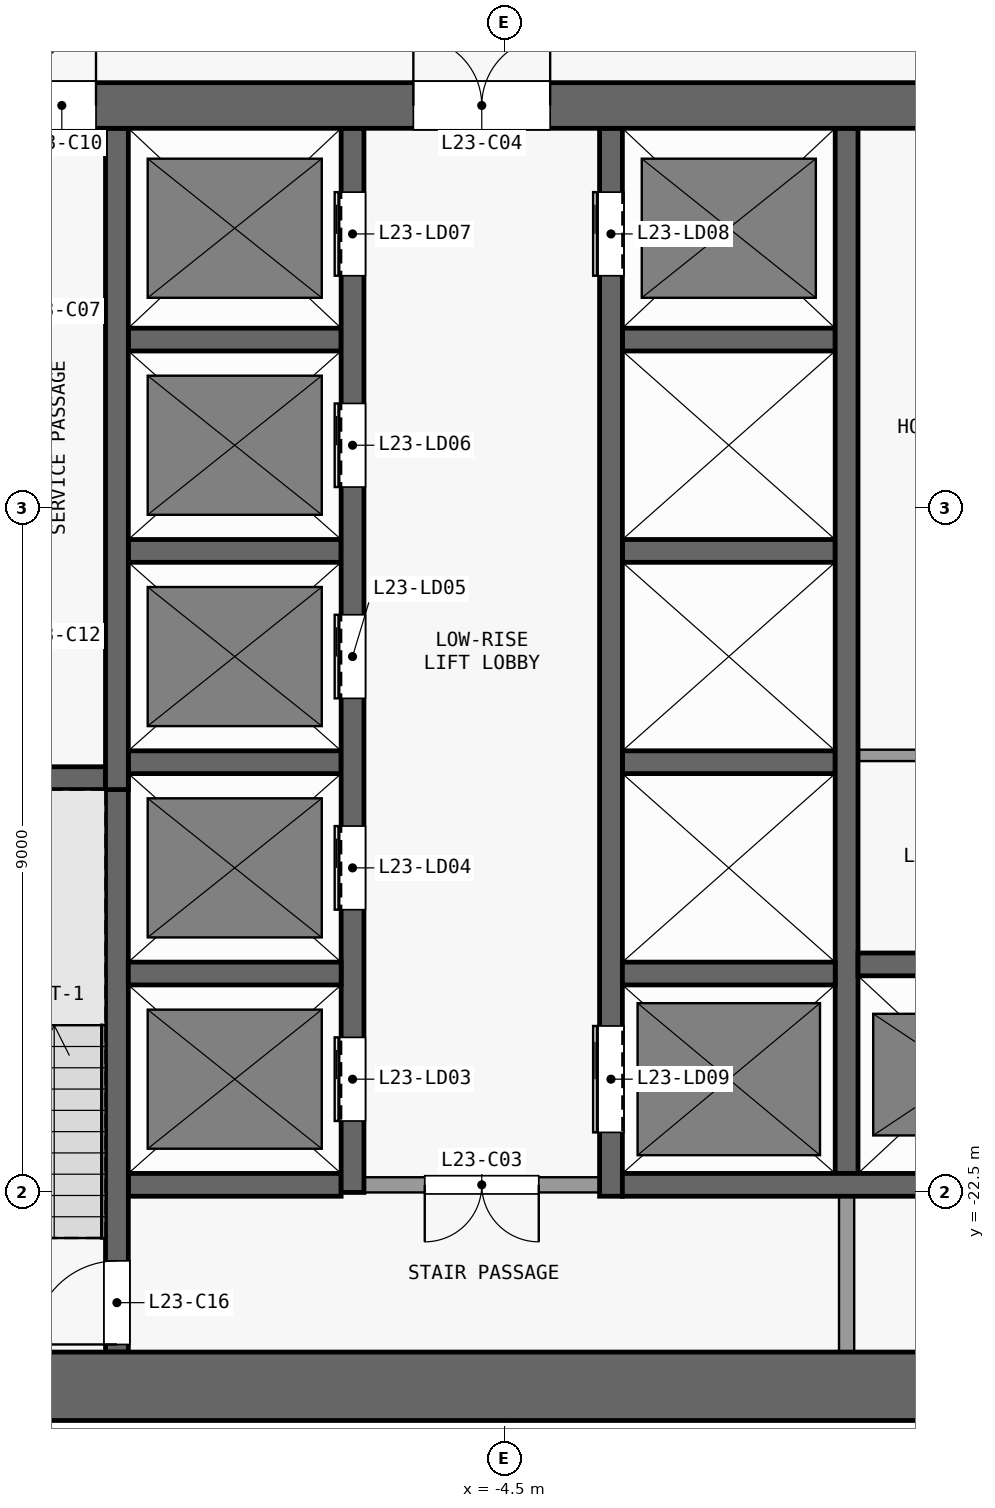
"""IFC4 building model, lengths in metres.
Left out: names, types, materials, properties, quantities, classifications, styles, units other than length and angle.
Written with IfcOpenShell. Run it as: python <this file> out.ifc"""

import sys

from ifc_helpers import new_model, si_unit, direction, frame, frame_2d, origin, place, context, subcontext, project, spatial, rectangle, extrude, element, fill, save


model = new_model("IFC4")
c1 = context("Model", 3, precision=1e-05, world=origin(), true_north=direction((0.0, 1.0)))
c2 = subcontext(c1, "Body", "Model", "MODEL_VIEW")
j1 = project(units=[si_unit("LENGTHUNIT", "METRE"), si_unit("PLANEANGLEUNIT", "RADIAN")], contexts=[c1])
p1 = place(None, origin())
s1 = spatial("IfcSite", under=j1, at=p1, CompositionType="ELEMENT")
p2 = place(p1, origin())
s2 = spatial("IfcBuilding", under=s1, at=p2, CompositionType="ELEMENT")
p3 = place(p2, frame((0.0, 0.0, 95.5)))
s3 = spatial("IfcBuildingStorey", under=s2, at=p3, CompositionType="ELEMENT", Elevation=95.5)
p4 = place(p3, frame((-13.4, -25.05, 0.0), z_axis=(0.0, 0.0, 1.0), x_axis=(1.0, 0.0, 0.0)))
e1 = element("IfcWall", 1, at=p4, inside=s3, PredefinedType="SHEAR", context=c2, shape_type="SweptSolid", body=[
    extrude(rectangle(XDim=26.8, YDim=0.9, at=frame_2d((13.4, 0.0))), origin(), (0.0, 0.0, 1.0), 3.3),
])
p5 = place(p3, frame((-13.4, -8.2, 0.0), z_axis=(0.0, 0.0, 1.0), x_axis=(1.0, 0.0, 0.0)))
e2 = element("IfcWall", 2, at=p5, inside=s3, PredefinedType="SHEAR", context=c2, shape_type="SweptSolid", body=[
    extrude(rectangle(XDim=26.8, YDim=0.6, at=frame_2d((13.4, 0.0))), origin(), (0.0, 0.0, 1.0), 3.3),
])
p6 = place(p5, frame((7.7, 0.0, 0.0)))
e3 = element("IfcOpeningElement", 3, at=p6, cuts=e2, PredefinedType="OPENING", context=c2, shape_type="SweptSolid", body=[
    extrude(rectangle(XDim=1.8, YDim=2.1, at=frame_2d((0.9, 1.05))), frame((0.0, 0.31, 0.0), z_axis=(0.0, -1.0, 0.0), x_axis=(1.0, 0.0, 0.0)), (0.0, 0.0, 1.0), 0.62),
])
p7 = place(p5, frame((17.3, 0.0, 0.0)))
e4 = element("IfcOpeningElement", 4, at=p7, cuts=e2, PredefinedType="OPENING", context=c2, shape_type="SweptSolid", body=[
    extrude(rectangle(XDim=1.8, YDim=2.1, at=frame_2d((0.9, 1.05))), frame((0.0, 0.31, 0.0), z_axis=(0.0, -1.0, 0.0), x_axis=(1.0, 0.0, 0.0)), (0.0, 0.0, 1.0), 0.62),
])
p8 = place(p5, frame((2.625, 0.0, 0.0)))
e5 = element("IfcOpeningElement", 5, at=p8, cuts=e2, PredefinedType="OPENING", context=c2, shape_type="SweptSolid", body=[
    extrude(rectangle(XDim=0.9, YDim=2.1, at=frame_2d((0.45, 1.05))), frame((0.0, 0.31, 0.0), z_axis=(0.0, -1.0, 0.0), x_axis=(1.0, 0.0, 0.0)), (0.0, 0.0, 1.0), 0.62),
])
p9 = place(p5, frame((23.275, 0.0, 0.0)))
e6 = element("IfcOpeningElement", 6, at=p9, cuts=e2, PredefinedType="OPENING", context=c2, shape_type="SweptSolid", body=[
    extrude(rectangle(XDim=0.9, YDim=2.1, at=frame_2d((0.45, 1.05))), frame((0.0, 0.31, 0.0), z_axis=(0.0, -1.0, 0.0), x_axis=(1.0, 0.0, 0.0)), (0.0, 0.0, 1.0), 0.62),
])
p10 = place(p3, frame((-9.45, -22.4, 0.0), z_axis=(0.0, 0.0, 1.0), x_axis=(1.0, 0.0, 0.0)))
e7 = element("IfcWall", 7, at=p10, inside=s3, PredefinedType="SHEAR", context=c2, shape_type="SweptSolid", body=[
    extrude(rectangle(XDim=2.8, YDim=0.3, at=frame_2d((1.4, 0.0))), origin(), (0.0, 0.0, 1.0), 3.3),
])
p11 = place(p3, frame((-3.25, -22.4, 0.0), z_axis=(0.0, 0.0, 1.0), x_axis=(-1.0, 0.0, 0.0)))
e8 = element("IfcWall", 8, at=p11, inside=s3, PredefinedType="PARTITIONING", context=c2, shape_type="SweptSolid", body=[
    extrude(rectangle(XDim=3.1, YDim=0.2, at=frame_2d((1.55, 0.0))), origin(), (0.0, 0.0, 1.0), 3.3),
])
p12 = place(p11, frame((0.8, 0.0, 0.0)))
e9 = element("IfcOpeningElement", 9, at=p12, cuts=e8, PredefinedType="OPENING", context=c2, shape_type="SweptSolid", body=[
    extrude(rectangle(XDim=1.5, YDim=2.1, at=frame_2d((0.75, 1.05))), frame((0.0, 0.11, 0.0), z_axis=(0.0, -1.0, 0.0), x_axis=(1.0, 0.0, 0.0)), (0.0, 0.0, 1.0), 0.22),
])
p13 = place(p3, frame((-2.95, -22.4, 0.0), z_axis=(0.0, 0.0, 1.0), x_axis=(1.0, 0.0, 0.0)))
e10 = element("IfcWall", 10, at=p13, inside=s3, PredefinedType="SHEAR", context=c2, shape_type="SweptSolid", body=[
    extrude(rectangle(XDim=6.2, YDim=0.3, at=frame_2d((3.1, 0.0))), origin(), (0.0, 0.0, 1.0), 3.3),
])
for number, where, z_axis, x_axis in (
    (11, (-9.45, -19.62, 0.0), (0.0, 0.0, 1.0), (1.0, 0.0, 0.0)),
    (12, (-2.95, -19.62, 0.0), (0.0, 0.0, 1.0), (1.0, 0.0, 0.0)),
):
    element("IfcWall", number, at=place(p3, frame(where, z_axis=z_axis, x_axis=x_axis)), inside=s3, PredefinedType="SHEAR", context=c2, shape_type="SweptSolid", body=[
        extrude(rectangle(XDim=2.8, YDim=0.3, at=frame_2d((1.4, 0.0))), origin(), (0.0, 0.0, 1.0), 3.3),
    ])
p14 = place(p3, frame((0.15, -19.5, 0.0), z_axis=(0.0, 0.0, 1.0), x_axis=(1.0, 0.0, 0.0)))
e13 = element("IfcWall", 13, at=p14, inside=s3, PredefinedType="SHEAR", context=c2, shape_type="SweptSolid", body=[
    extrude(rectangle(XDim=3.025, YDim=0.3, at=frame_2d((1.513, 0.0))), origin(), (0.0, 0.0, 1.0), 3.3),
])
p15 = place(p3, frame((-12.6, -17.05, 0.0), z_axis=(0.0, 0.0, 1.0), x_axis=(1.0, 0.0, 0.0)))
e14 = element("IfcWall", 14, at=p15, inside=s3, PredefinedType="SHEAR", context=c2, shape_type="SweptSolid", body=[
    extrude(rectangle(XDim=2.85, YDim=0.3, at=frame_2d((1.425, 0.0))), origin(), (0.0, 0.0, 1.0), 3.3),
])
for number, where, z_axis, x_axis in (
    (15, (-9.45, -16.84, 0.0), (0.0, 0.0, 1.0), (1.0, 0.0, 0.0)),
    (16, (-2.95, -16.84, 0.0), (0.0, 0.0, 1.0), (1.0, 0.0, 0.0)),
):
    element("IfcWall", number, at=place(p3, frame(where, z_axis=z_axis, x_axis=x_axis)), inside=s3, PredefinedType="SHEAR", context=c2, shape_type="SweptSolid", body=[
        extrude(rectangle(XDim=2.8, YDim=0.3, at=frame_2d((1.4, 0.0))), origin(), (0.0, 0.0, 1.0), 3.3),
    ])
p16 = place(p3, frame((0.15, -16.75, 0.0), z_axis=(0.0, 0.0, 1.0), x_axis=(1.0, 0.0, 0.0)))
e17 = element("IfcWall", 17, at=p16, inside=s3, PredefinedType="PARTITIONING", context=c2, shape_type="SweptSolid", body=[
    extrude(rectangle(XDim=2.875, YDim=0.15, at=frame_2d((1.438, 0.0))), origin(), (0.0, 0.0, 1.0), 3.3),
])
for number, where, z_axis, x_axis in (
    (18, (-9.45, -14.06, 0.0), (0.0, 0.0, 1.0), (1.0, 0.0, 0.0)),
    (19, (-2.95, -14.06, 0.0), (0.0, 0.0, 1.0), (1.0, 0.0, 0.0)),
    (20, (-9.45, -11.28, 0.0), (0.0, 0.0, 1.0), (1.0, 0.0, 0.0)),
    (21, (-2.95, -11.28, 0.0), (0.0, 0.0, 1.0), (1.0, 0.0, 0.0)),
):
    element("IfcWall", number, at=place(p3, frame(where, z_axis=z_axis, x_axis=x_axis)), inside=s3, PredefinedType="SHEAR", context=c2, shape_type="SweptSolid", body=[
        extrude(rectangle(XDim=2.8, YDim=0.3, at=frame_2d((1.4, 0.0))), origin(), (0.0, 0.0, 1.0), 3.3),
    ])
p17 = place(p3, frame((-9.6, -24.6, 0.0), z_axis=(0.0, 0.0, 1.0), x_axis=(0.0, 1.0, 0.0)))
e22 = element("IfcWall", 22, at=p17, inside=s3, PredefinedType="SHEAR", context=c2, shape_type="SweptSolid", body=[
    extrude(rectangle(XDim=7.7, YDim=0.3, at=frame_2d((3.85, 0.0))), origin(), (0.0, 0.0, 1.0), 3.3),
])
p18 = place(p17, frame((0.1, 0.0, 0.0)))
e23 = element("IfcOpeningElement", 23, at=p18, cuts=e22, PredefinedType="OPENING", context=c2, shape_type="SweptSolid", body=[
    extrude(rectangle(XDim=1.1, YDim=2.1, at=frame_2d((0.55, 1.05))), frame((0.0, 0.16, 0.0), z_axis=(0.0, -1.0, 0.0), x_axis=(1.0, 0.0, 0.0)), (0.0, 0.0, 1.0), 0.32),
])
p19 = place(p3, frame((-9.6, -17.2, 0.0), z_axis=(0.0, 0.0, 1.0), x_axis=(0.0, 1.0, 0.0)))
e24 = element("IfcWall", 24, at=p19, inside=s3, PredefinedType="SHEAR", context=c2, shape_type="SweptSolid", body=[
    extrude(rectangle(XDim=8.7, YDim=0.3, at=frame_2d((4.35, 0.0))), origin(), (0.0, 0.0, 1.0), 3.3),
])
p20 = place(p3, frame((-6.5, -22.5, 0.0), z_axis=(0.0, 0.0, 1.0), x_axis=(0.0, 1.0, 0.0)))
e25 = element("IfcWall", 25, at=p20, inside=s3, PredefinedType="SHEAR", context=c2, shape_type="SweptSolid", body=[
    extrude(rectangle(XDim=14.0, YDim=0.3, at=frame_2d((7.0, 0.0))), origin(), (0.0, 0.0, 1.0), 3.3),
])
p21 = place(p20, frame((0.94, 0.0, 0.0)))
e26 = element("IfcOpeningElement", 26, at=p21, cuts=e25, PredefinedType="OPENING", context=c2, shape_type="SweptSolid", body=[
    extrude(rectangle(XDim=1.1, YDim=2.1, at=frame_2d((0.55, 1.05))), frame((0.0, 0.16, 0.0), z_axis=(0.0, -1.0, 0.0), x_axis=(1.0, 0.0, 0.0)), (0.0, 0.0, 1.0), 0.32),
])
p22 = place(p20, frame((3.72, 0.0, 0.0)))
e27 = element("IfcOpeningElement", 27, at=p22, cuts=e25, PredefinedType="OPENING", context=c2, shape_type="SweptSolid", body=[
    extrude(rectangle(XDim=1.1, YDim=2.1, at=frame_2d((0.55, 1.05))), frame((0.0, 0.16, 0.0), z_axis=(0.0, -1.0, 0.0), x_axis=(1.0, 0.0, 0.0)), (0.0, 0.0, 1.0), 0.32),
])
p23 = place(p20, frame((6.5, 0.0, 0.0)))
e28 = element("IfcOpeningElement", 28, at=p23, cuts=e25, PredefinedType="OPENING", context=c2, shape_type="SweptSolid", body=[
    extrude(rectangle(XDim=1.1, YDim=2.1, at=frame_2d((0.55, 1.05))), frame((0.0, 0.16, 0.0), z_axis=(0.0, -1.0, 0.0), x_axis=(1.0, 0.0, 0.0)), (0.0, 0.0, 1.0), 0.32),
])
p24 = place(p20, frame((9.28, 0.0, 0.0)))
e29 = element("IfcOpeningElement", 29, at=p24, cuts=e25, PredefinedType="OPENING", context=c2, shape_type="SweptSolid", body=[
    extrude(rectangle(XDim=1.1, YDim=2.1, at=frame_2d((0.55, 1.05))), frame((0.0, 0.16, 0.0), z_axis=(0.0, -1.0, 0.0), x_axis=(1.0, 0.0, 0.0)), (0.0, 0.0, 1.0), 0.32),
])
p25 = place(p20, frame((12.06, 0.0, 0.0)))
e30 = element("IfcOpeningElement", 30, at=p25, cuts=e25, PredefinedType="OPENING", context=c2, shape_type="SweptSolid", body=[
    extrude(rectangle(XDim=1.1, YDim=2.1, at=frame_2d((0.55, 1.05))), frame((0.0, 0.16, 0.0), z_axis=(0.0, -1.0, 0.0), x_axis=(1.0, 0.0, 0.0)), (0.0, 0.0, 1.0), 0.32),
])
p26 = place(p3, frame((-3.1, -22.55, 0.0), z_axis=(0.0, 0.0, 1.0), x_axis=(0.0, 1.0, 0.0)))
e31 = element("IfcWall", 31, at=p26, inside=s3, PredefinedType="SHEAR", context=c2, shape_type="SweptSolid", body=[
    extrude(rectangle(XDim=14.05, YDim=0.3, at=frame_2d((7.025, 0.0))), origin(), (0.0, 0.0, 1.0), 3.3),
])
p27 = place(p26, frame((12.11, 0.0, 0.0)))
e32 = element("IfcOpeningElement", 32, at=p27, cuts=e31, PredefinedType="OPENING", context=c2, shape_type="SweptSolid", body=[
    extrude(rectangle(XDim=1.1, YDim=2.1, at=frame_2d((0.55, 1.05))), frame((0.0, 0.16, 0.0), z_axis=(0.0, -1.0, 0.0), x_axis=(1.0, 0.0, 0.0)), (0.0, 0.0, 1.0), 0.32),
])
p28 = place(p26, frame((0.84, 0.0, 0.0)))
e33 = element("IfcOpeningElement", 33, at=p28, cuts=e31, PredefinedType="OPENING", context=c2, shape_type="SweptSolid", body=[
    extrude(rectangle(XDim=1.4, YDim=2.1, at=frame_2d((0.7, 1.05))), frame((0.0, 0.16, 0.0), z_axis=(0.0, -1.0, 0.0), x_axis=(1.0, 0.0, 0.0)), (0.0, 0.0, 1.0), 0.32),
])
p29 = place(p3, frame((0.0, -24.6, 0.0), z_axis=(0.0, 0.0, 1.0), x_axis=(0.0, 1.0, 0.0)))
e34 = element("IfcWall", 34, at=p29, inside=s3, PredefinedType="PARTITIONING", context=c2, shape_type="SweptSolid", body=[
    extrude(rectangle(XDim=2.05, YDim=0.2, at=frame_2d((1.025, 0.0))), origin(), (0.0, 0.0, 1.0), 3.3),
])
p30 = place(p3, frame((0.0, -22.25, 0.0), z_axis=(0.0, 0.0, 1.0), x_axis=(0.0, 1.0, 0.0)))
e35 = element("IfcWall", 35, at=p30, inside=s3, PredefinedType="SHEAR", context=c2, shape_type="SweptSolid", body=[
    extrude(rectangle(XDim=13.75, YDim=0.3, at=frame_2d((6.875, 0.0))), origin(), (0.0, 0.0, 1.0), 3.3),
])
p31 = place(p21, origin())
e36 = element("IfcDoor", 36, at=p31, inside=s3, OperationType="DOUBLE_DOOR_SLIDING", PredefinedType="DOOR", context=c2, shape_type="SweptSolid", body=[
    extrude(rectangle(XDim=1.1, YDim=2.1, at=frame_2d((0.55, 1.05))), frame((0.0, 0.025, 0.0), z_axis=(0.0, -1.0, 0.0), x_axis=(1.0, 0.0, 0.0)), (0.0, 0.0, 1.0), 0.05),
])
fill(e26, e36)
p32 = place(p22, origin())
e37 = element("IfcDoor", 37, at=p32, inside=s3, OperationType="DOUBLE_DOOR_SLIDING", PredefinedType="DOOR", context=c2, shape_type="SweptSolid", body=[
    extrude(rectangle(XDim=1.1, YDim=2.1, at=frame_2d((0.55, 1.05))), frame((0.0, 0.025, 0.0), z_axis=(0.0, -1.0, 0.0), x_axis=(1.0, 0.0, 0.0)), (0.0, 0.0, 1.0), 0.05),
])
fill(e27, e37)
p33 = place(p23, origin())
e38 = element("IfcDoor", 38, at=p33, inside=s3, OperationType="DOUBLE_DOOR_SLIDING", PredefinedType="DOOR", context=c2, shape_type="SweptSolid", body=[
    extrude(rectangle(XDim=1.1, YDim=2.1, at=frame_2d((0.55, 1.05))), frame((0.0, 0.025, 0.0), z_axis=(0.0, -1.0, 0.0), x_axis=(1.0, 0.0, 0.0)), (0.0, 0.0, 1.0), 0.05),
])
fill(e28, e38)
p34 = place(p24, origin())
e39 = element("IfcDoor", 39, at=p34, inside=s3, OperationType="DOUBLE_DOOR_SLIDING", PredefinedType="DOOR", context=c2, shape_type="SweptSolid", body=[
    extrude(rectangle(XDim=1.1, YDim=2.1, at=frame_2d((0.55, 1.05))), frame((0.0, 0.025, 0.0), z_axis=(0.0, -1.0, 0.0), x_axis=(1.0, 0.0, 0.0)), (0.0, 0.0, 1.0), 0.05),
])
fill(e29, e39)
p35 = place(p25, origin())
e40 = element("IfcDoor", 40, at=p35, inside=s3, OperationType="DOUBLE_DOOR_SLIDING", PredefinedType="DOOR", context=c2, shape_type="SweptSolid", body=[
    extrude(rectangle(XDim=1.1, YDim=2.1, at=frame_2d((0.55, 1.05))), frame((0.0, 0.025, 0.0), z_axis=(0.0, -1.0, 0.0), x_axis=(1.0, 0.0, 0.0)), (0.0, 0.0, 1.0), 0.05),
])
fill(e30, e40)
p36 = place(p27, origin())
e41 = element("IfcDoor", 41, at=p36, inside=s3, OperationType="DOUBLE_DOOR_SLIDING", PredefinedType="DOOR", context=c2, shape_type="SweptSolid", body=[
    extrude(rectangle(XDim=1.1, YDim=2.1, at=frame_2d((0.55, 1.05))), frame((0.0, 0.025, 0.0), z_axis=(0.0, -1.0, 0.0), x_axis=(1.0, 0.0, 0.0)), (0.0, 0.0, 1.0), 0.05),
])
fill(e32, e41)
p37 = place(p28, origin())
e42 = element("IfcDoor", 42, at=p37, inside=s3, OperationType="DOUBLE_DOOR_SLIDING", PredefinedType="DOOR", context=c2, shape_type="SweptSolid", body=[
    extrude(rectangle(XDim=1.4, YDim=2.1, at=frame_2d((0.7, 1.05))), frame((0.0, 0.025, 0.0), z_axis=(0.0, -1.0, 0.0), x_axis=(1.0, 0.0, 0.0)), (0.0, 0.0, 1.0), 0.05),
])
fill(e33, e42)
p38 = place(p12, origin())
e43 = element("IfcDoor", 43, at=p38, inside=s3, OperationType="DOUBLE_DOOR_SINGLE_SWING", PredefinedType="DOOR", context=c2, shape_type="SweptSolid", body=[
    extrude(rectangle(XDim=1.5, YDim=2.1, at=frame_2d((0.75, 1.05))), frame((0.0, 0.025, 0.0), z_axis=(0.0, -1.0, 0.0), x_axis=(1.0, 0.0, 0.0)), (0.0, 0.0, 1.0), 0.05),
])
fill(e9, e43)
p39 = place(p6, origin())
e44 = element("IfcDoor", 44, at=p39, inside=s3, OperationType="DOUBLE_DOOR_SINGLE_SWING", PredefinedType="DOOR", context=c2, shape_type="SweptSolid", body=[
    extrude(rectangle(XDim=1.8, YDim=2.1, at=frame_2d((0.9, 1.05))), frame((0.0, 0.025, 0.0), z_axis=(0.0, -1.0, 0.0), x_axis=(1.0, 0.0, 0.0)), (0.0, 0.0, 1.0), 0.05),
])
fill(e3, e44)
p40 = place(p8, origin())
e45 = element("IfcDoor", 45, at=p40, inside=s3, OperationType="SINGLE_SWING_RIGHT", PredefinedType="DOOR", context=c2, shape_type="SweptSolid", body=[
    extrude(rectangle(XDim=0.9, YDim=2.1, at=frame_2d((0.45, 1.05))), frame((0.0, 0.025, 0.0), z_axis=(0.0, -1.0, 0.0), x_axis=(1.0, 0.0, 0.0)), (0.0, 0.0, 1.0), 0.05),
])
fill(e5, e45)
p41 = place(p18, origin())
e46 = element("IfcDoor", 46, at=p41, inside=s3, OperationType="SINGLE_SWING_LEFT", PredefinedType="DOOR", context=c2, shape_type="SweptSolid", body=[
    extrude(rectangle(XDim=1.1, YDim=2.1, at=frame_2d((0.55, 1.05))), frame((0.0, 0.025, 0.0), z_axis=(0.0, -1.0, 0.0), x_axis=(1.0, 0.0, 0.0)), (0.0, 0.0, 1.0), 0.05),
])
fill(e23, e46)
save(model, sys.argv[1])
